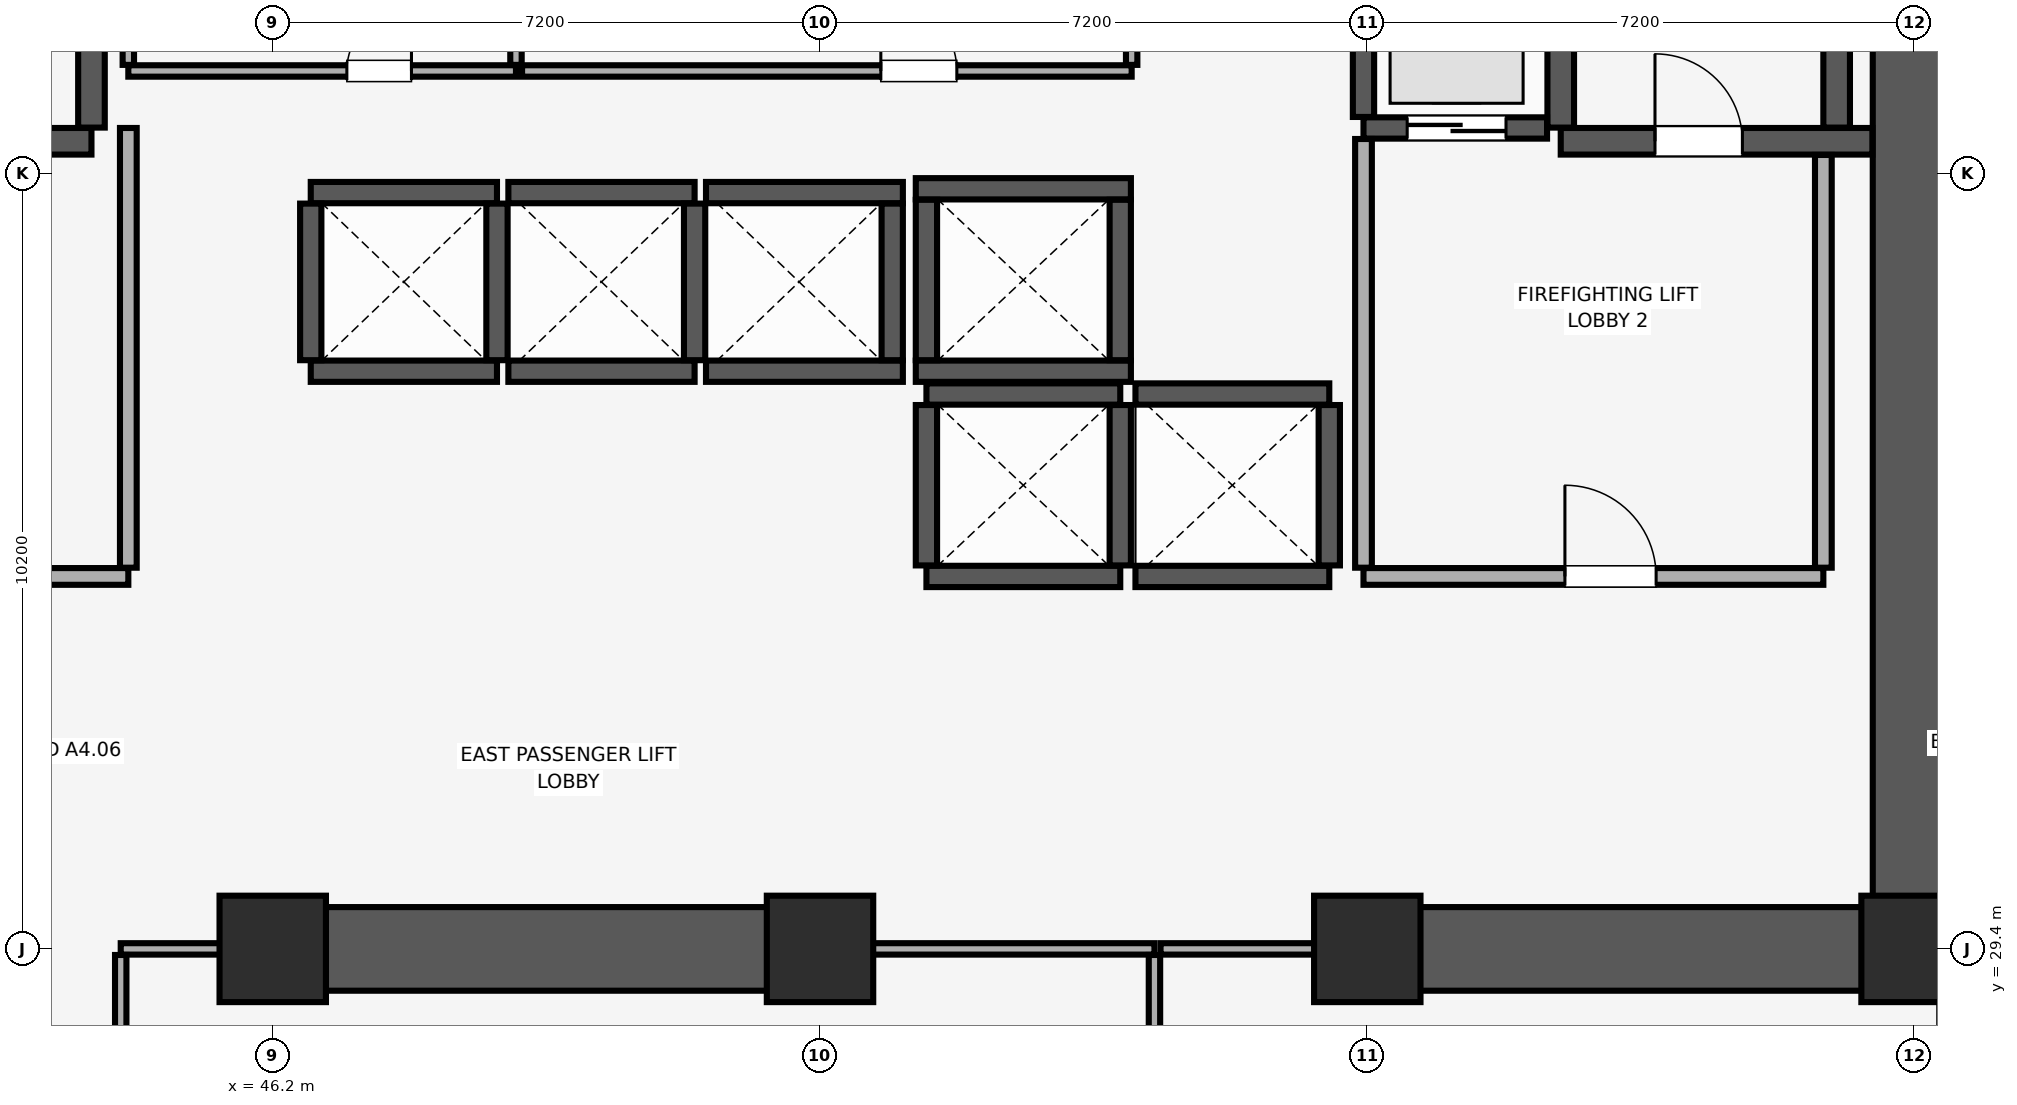
"""IFC4 building model, lengths in metres.
Left out: names, types, materials, properties, quantities, classifications, styles, units other than length and angle.
Written with IfcOpenShell. Run it as: python <this file> out.ifc"""

import sys

from ifc_helpers import new_model, si_unit, direction, frame, frame_2d, origin, origin_2d, place, context, subcontext, project, spatial, rectangle, extrude, element, fill, save


model = new_model("IFC4")
c1 = context("Model", 3, precision=1e-05, world=origin(), true_north=direction((0.0, 1.0)))
c2 = subcontext(c1, "Body", "Model", "MODEL_VIEW")
j1 = project(units=[si_unit("LENGTHUNIT", "METRE"), si_unit("PLANEANGLEUNIT", "RADIAN")], contexts=[c1])
p1 = place(None, origin())
s1 = spatial("IfcSite", under=j1, at=p1, CompositionType="ELEMENT")
p2 = place(p1, origin())
s2 = spatial("IfcBuilding", under=s1, at=p2, CompositionType="ELEMENT")
p3 = place(p2, frame((0.0, 0.0, 57.65)))
s3 = spatial("IfcBuildingStorey", under=s2, at=p3, CompositionType="ELEMENT", Elevation=57.65)
for number, where, z_axis, x_axis in (
    (1, (46.2, 29.4, 0.0), (0.0, 0.0, 1.0), (1.0, 0.0, 0.0)),
    (2, (53.4, 29.4, 0.0), (0.0, 0.0, 1.0), (1.0, 0.0, 0.0)),
    (3, (60.6, 29.4, 0.0), (0.0, 0.0, 1.0), (1.0, 0.0, 0.0)),
    (4, (67.8, 29.4, 0.0), (0.0, 0.0, 1.0), (1.0, 0.0, 0.0)),
):
    element("IfcColumn", number, at=place(p3, frame(where, z_axis=z_axis, x_axis=x_axis)), inside=s3, PredefinedType="COLUMN", context=c2, shape_type="SweptSolid", body=[
        extrude(rectangle(XDim=1.4, YDim=1.4, at=origin_2d()), origin(), (0.0, 0.0, 1.0), 3.51),
    ])
p4 = place(p3, frame((67.8, 29.4, 0.0), z_axis=(0.0, 0.0, 1.0), x_axis=(0.0, 1.0, 0.0)))
e5 = element("IfcWall", 5, at=p4, inside=s3, PredefinedType="SHEAR", context=c2, shape_type="SweptSolid", body=[
    extrude(rectangle(XDim=19.2, YDim=1.1, at=frame_2d((9.6, 0.0))), origin(), (0.0, 0.0, 1.0), 3.51),
])
p5 = place(p3, frame((46.0, 29.4, 0.0), z_axis=(0.0, 0.0, 1.0), x_axis=(1.0, 0.0, 0.0)))
e6 = element("IfcWall", 6, at=p5, inside=s3, PredefinedType="SHEAR", context=c2, shape_type="SweptSolid", body=[
    extrude(rectangle(XDim=7.6, YDim=1.1, at=frame_2d((3.8, 0.0))), origin(), (0.0, 0.0, 1.0), 3.51),
])
p6 = place(p3, frame((60.4, 29.4, 0.0), z_axis=(0.0, 0.0, 1.0), x_axis=(1.0, 0.0, 0.0)))
e7 = element("IfcWall", 7, at=p6, inside=s3, PredefinedType="SHEAR", context=c2, shape_type="SweptSolid", body=[
    extrude(rectangle(XDim=6.845, YDim=1.1, at=frame_2d((3.423, 0.0))), origin(), (0.0, 0.0, 1.0), 3.51),
])
p7 = place(p3, frame((40.185, 40.025, 0.0), z_axis=(0.0, 0.0, 1.0), x_axis=(1.0, 0.0, 0.0)))
e8 = element("IfcWall", 8, at=p7, inside=s3, PredefinedType="SHEAR", context=c2, shape_type="SweptSolid", body=[
    extrude(rectangle(XDim=3.63, YDim=0.35, at=frame_2d((1.815, 0.0))), origin(), (0.0, 0.0, 1.0), 3.51),
])
p8 = place(p7, frame((1.24, 0.0, 0.0)))
e9 = element("IfcOpeningElement", 9, at=p8, cuts=e8, PredefinedType="OPENING", context=c2, shape_type="SweptSolid", body=[
    extrude(rectangle(XDim=1.15, YDim=2.15, at=frame_2d((0.575, 1.075))), frame((0.0, 0.185, 0.0), z_axis=(0.0, -1.0, 0.0), x_axis=(1.0, 0.0, 0.0)), (0.0, 0.0, 1.0), 0.37),
])
p9 = place(p3, frame((43.815, 40.205, 0.0), z_axis=(0.0, 0.0, 1.0), x_axis=(0.0, 1.0, 0.0)))
e10 = element("IfcWall", 10, at=p9, inside=s3, PredefinedType="SHEAR", context=c2, shape_type="SweptSolid", body=[
    extrude(rectangle(XDim=8.09, YDim=0.35, at=frame_2d((4.045, 0.0))), origin(), (0.0, 0.0, 1.0), 3.51),
])
p10 = place(p3, frame((63.145, 40.025, 0.0), z_axis=(0.0, 0.0, 1.0), x_axis=(1.0, 0.0, 0.0)))
e11 = element("IfcWall", 11, at=p10, inside=s3, PredefinedType="SHEAR", context=c2, shape_type="SweptSolid", body=[
    extrude(rectangle(XDim=4.1, YDim=0.35, at=frame_2d((2.05, 0.0))), origin(), (0.0, 0.0, 1.0), 3.51),
])
p11 = place(p10, frame((1.24, 0.0, 0.0)))
e12 = element("IfcOpeningElement", 12, at=p11, cuts=e11, PredefinedType="OPENING", context=c2, shape_type="SweptSolid", body=[
    extrude(rectangle(XDim=1.15, YDim=2.15, at=frame_2d((0.575, 1.075))), frame((0.0, 0.185, 0.0), z_axis=(0.0, -1.0, 0.0), x_axis=(1.0, 0.0, 0.0)), (0.0, 0.0, 1.0), 0.37),
])
for number, where, z_axis, x_axis in (
    (13, (63.145, 40.205, 0.0), (0.0, 0.0, 1.0), (0.0, 1.0, 0.0)),
    (14, (66.775, 40.205, 0.0), (0.0, 0.0, 1.0), (0.0, 1.0, 0.0)),
):
    element("IfcWall", number, at=place(p3, frame(where, z_axis=z_axis, x_axis=x_axis)), inside=s3, PredefinedType="SHEAR", context=c2, shape_type="SweptSolid", body=[
        extrude(rectangle(XDim=8.09, YDim=0.35, at=frame_2d((4.045, 0.0))), origin(), (0.0, 0.0, 1.0), 3.51),
    ])
for number, where, z_axis, x_axis in (
    (15, (46.7, 37.0, 0.0), (0.0, 0.0, 1.0), (1.0, 0.0, 0.0)),
    (16, (46.7, 39.35, 0.0), (0.0, 0.0, 1.0), (1.0, 0.0, 0.0)),
):
    element("IfcWall", number, at=place(p3, frame(where, z_axis=z_axis, x_axis=x_axis)), inside=s3, PredefinedType="SHEAR", context=c2, shape_type="SweptSolid", body=[
        extrude(rectangle(XDim=2.45, YDim=0.28, at=frame_2d((1.225, 0.0))), origin(), (0.0, 0.0, 1.0), 3.51),
    ])
for number, where, z_axis, x_axis in (
    (17, (46.7, 37.145, 0.0), (0.0, 0.0, 1.0), (0.0, 1.0, 0.0)),
    (18, (49.15, 37.145, 0.0), (0.0, 0.0, 1.0), (0.0, 1.0, 0.0)),
):
    element("IfcWall", number, at=place(p3, frame(where, z_axis=z_axis, x_axis=x_axis)), inside=s3, PredefinedType="SHEAR", context=c2, shape_type="SweptSolid", body=[
        extrude(rectangle(XDim=2.06, YDim=0.28, at=frame_2d((1.03, 0.0))), origin(), (0.0, 0.0, 1.0), 3.51),
    ])
for number, where, z_axis, x_axis in (
    (19, (49.3, 37.0, 0.0), (0.0, 0.0, 1.0), (1.0, 0.0, 0.0)),
    (20, (49.3, 39.35, 0.0), (0.0, 0.0, 1.0), (1.0, 0.0, 0.0)),
):
    element("IfcWall", number, at=place(p3, frame(where, z_axis=z_axis, x_axis=x_axis)), inside=s3, PredefinedType="SHEAR", context=c2, shape_type="SweptSolid", body=[
        extrude(rectangle(XDim=2.45, YDim=0.28, at=frame_2d((1.225, 0.0))), origin(), (0.0, 0.0, 1.0), 3.51),
    ])
p12 = place(p3, frame((51.75, 37.145, 0.0), z_axis=(0.0, 0.0, 1.0), x_axis=(0.0, 1.0, 0.0)))
e21 = element("IfcWall", 21, at=p12, inside=s3, PredefinedType="SHEAR", context=c2, shape_type="SweptSolid", body=[
    extrude(rectangle(XDim=2.06, YDim=0.28, at=frame_2d((1.03, 0.0))), origin(), (0.0, 0.0, 1.0), 3.51),
])
for number, where, z_axis, x_axis in (
    (22, (51.9, 37.0, 0.0), (0.0, 0.0, 1.0), (1.0, 0.0, 0.0)),
    (23, (51.9, 39.35, 0.0), (0.0, 0.0, 1.0), (1.0, 0.0, 0.0)),
):
    element("IfcWall", number, at=place(p3, frame(where, z_axis=z_axis, x_axis=x_axis)), inside=s3, PredefinedType="SHEAR", context=c2, shape_type="SweptSolid", body=[
        extrude(rectangle(XDim=2.59, YDim=0.28, at=frame_2d((1.295, 0.0))), origin(), (0.0, 0.0, 1.0), 3.51),
    ])
p13 = place(p3, frame((54.35, 37.145, 0.0), z_axis=(0.0, 0.0, 1.0), x_axis=(0.0, 1.0, 0.0)))
e24 = element("IfcWall", 24, at=p13, inside=s3, PredefinedType="SHEAR", context=c2, shape_type="SweptSolid", body=[
    extrude(rectangle(XDim=2.06, YDim=0.28, at=frame_2d((1.03, 0.0))), origin(), (0.0, 0.0, 1.0), 3.51),
])
for number, where, z_axis, x_axis in (
    (25, (54.8, 34.3, 0.0), (0.0, 0.0, 1.0), (1.0, 0.0, 0.0)),
    (26, (54.8, 36.7, 0.0), (0.0, 0.0, 1.0), (1.0, 0.0, 0.0)),
):
    element("IfcWall", number, at=place(p3, frame(where, z_axis=z_axis, x_axis=x_axis)), inside=s3, PredefinedType="SHEAR", context=c2, shape_type="SweptSolid", body=[
        extrude(rectangle(XDim=2.55, YDim=0.28, at=frame_2d((1.275, 0.0))), origin(), (0.0, 0.0, 1.0), 3.51),
    ])
for number, where, z_axis, x_axis in (
    (27, (54.8, 34.445, 0.0), (0.0, 0.0, 1.0), (0.0, 1.0, 0.0)),
    (28, (57.35, 34.445, 0.0), (0.0, 0.0, 1.0), (0.0, 1.0, 0.0)),
):
    element("IfcWall", number, at=place(p3, frame(where, z_axis=z_axis, x_axis=x_axis)), inside=s3, PredefinedType="SHEAR", context=c2, shape_type="SweptSolid", body=[
        extrude(rectangle(XDim=2.11, YDim=0.28, at=frame_2d((1.055, 0.0))), origin(), (0.0, 0.0, 1.0), 3.51),
    ])
for number, where, z_axis, x_axis in (
    (29, (57.55, 34.3, 0.0), (0.0, 0.0, 1.0), (1.0, 0.0, 0.0)),
    (30, (57.55, 36.7, 0.0), (0.0, 0.0, 1.0), (1.0, 0.0, 0.0)),
):
    element("IfcWall", number, at=place(p3, frame(where, z_axis=z_axis, x_axis=x_axis)), inside=s3, PredefinedType="SHEAR", context=c2, shape_type="SweptSolid", body=[
        extrude(rectangle(XDim=2.55, YDim=0.28, at=frame_2d((1.275, 0.0))), origin(), (0.0, 0.0, 1.0), 3.51),
    ])
p14 = place(p3, frame((60.1, 34.445, 0.0), z_axis=(0.0, 0.0, 1.0), x_axis=(0.0, 1.0, 0.0)))
e31 = element("IfcWall", 31, at=p14, inside=s3, PredefinedType="SHEAR", context=c2, shape_type="SweptSolid", body=[
    extrude(rectangle(XDim=2.11, YDim=0.28, at=frame_2d((1.055, 0.0))), origin(), (0.0, 0.0, 1.0), 3.51),
])
for number, where, z_axis, x_axis in (
    (32, (54.66, 37.0, 0.0), (0.0, 0.0, 1.0), (1.0, 0.0, 0.0)),
    (33, (54.66, 39.4, 0.0), (0.0, 0.0, 1.0), (1.0, 0.0, 0.0)),
):
    element("IfcWall", number, at=place(p3, frame(where, z_axis=z_axis, x_axis=x_axis)), inside=s3, PredefinedType="SHEAR", context=c2, shape_type="SweptSolid", body=[
        extrude(rectangle(XDim=2.83, YDim=0.28, at=frame_2d((1.415, 0.0))), origin(), (0.0, 0.0, 1.0), 3.51),
    ])
for number, where, z_axis, x_axis in (
    (34, (54.8, 37.145, 0.0), (0.0, 0.0, 1.0), (0.0, 1.0, 0.0)),
    (35, (57.35, 37.145, 0.0), (0.0, 0.0, 1.0), (0.0, 1.0, 0.0)),
):
    element("IfcWall", number, at=place(p3, frame(where, z_axis=z_axis, x_axis=x_axis)), inside=s3, PredefinedType="SHEAR", context=c2, shape_type="SweptSolid", body=[
        extrude(rectangle(XDim=2.11, YDim=0.28, at=frame_2d((1.055, 0.0))), origin(), (0.0, 0.0, 1.0), 3.51),
    ])
p15 = place(p3, frame((60.55, 40.2, 0.0), z_axis=(0.0, 0.0, 1.0), x_axis=(1.0, 0.0, 0.0)))
e36 = element("IfcWall", 36, at=p15, inside=s3, PredefinedType="SHEAR", context=c2, shape_type="SweptSolid", body=[
    extrude(rectangle(XDim=2.415, YDim=0.28, at=frame_2d((1.208, 0.0))), origin(), (0.0, 0.0, 1.0), 3.51),
])
p16 = place(p15, frame((0.575, 0.0, 0.0)))
e37 = element("IfcOpeningElement", 37, at=p16, cuts=e36, PredefinedType="OPENING", context=c2, shape_type="SweptSolid", body=[
    extrude(rectangle(XDim=1.3, YDim=2.3, at=frame_2d((0.65, 1.15))), frame((0.0, 0.15, 0.0), z_axis=(0.0, -1.0, 0.0), x_axis=(1.0, 0.0, 0.0)), (0.0, 0.0, 1.0), 0.3),
])
p17 = place(p3, frame((60.55, 40.345, 0.0), z_axis=(0.0, 0.0, 1.0), x_axis=(0.0, 1.0, 0.0)))
e38 = element("IfcWall", 38, at=p17, inside=s3, PredefinedType="SHEAR", context=c2, shape_type="SweptSolid", body=[
    extrude(rectangle(XDim=2.81, YDim=0.28, at=frame_2d((1.405, 0.0))), origin(), (0.0, 0.0, 1.0), 3.51),
])
p18 = place(p3, frame((60.55, 34.3, 0.0), z_axis=(0.0, 0.0, 1.0), x_axis=(1.0, 0.0, 0.0)))
e39 = element("IfcWall", 39, at=p18, inside=s3, PredefinedType="PARTITIONING", context=c2, shape_type="SweptSolid", body=[
    extrude(rectangle(XDim=6.05, YDim=0.22, at=frame_2d((3.025, 0.0))), origin(), (0.0, 0.0, 1.0), 3.51),
])
p19 = place(p18, frame((2.65, 0.0, 0.0)))
e40 = element("IfcOpeningElement", 40, at=p19, cuts=e39, PredefinedType="OPENING", context=c2, shape_type="SweptSolid", body=[
    extrude(rectangle(XDim=1.2, YDim=2.15, at=frame_2d((0.6, 1.075))), frame((0.0, 0.12, 0.0), z_axis=(0.0, -1.0, 0.0), x_axis=(1.0, 0.0, 0.0)), (0.0, 0.0, 1.0), 0.24),
])
p20 = place(p3, frame((60.55, 34.415, 0.0), z_axis=(0.0, 0.0, 1.0), x_axis=(0.0, 1.0, 0.0)))
e41 = element("IfcWall", 41, at=p20, inside=s3, PredefinedType="PARTITIONING", context=c2, shape_type="SweptSolid", body=[
    extrude(rectangle(XDim=5.64, YDim=0.22, at=frame_2d((2.82, 0.0))), origin(), (0.0, 0.0, 1.0), 3.51),
])
p21 = place(p3, frame((66.6, 34.415, 0.0), z_axis=(0.0, 0.0, 1.0), x_axis=(0.0, 1.0, 0.0)))
e42 = element("IfcWall", 42, at=p21, inside=s3, PredefinedType="PARTITIONING", context=c2, shape_type="SweptSolid", body=[
    extrude(rectangle(XDim=5.43, YDim=0.22, at=frame_2d((2.715, 0.0))), origin(), (0.0, 0.0, 1.0), 3.51),
])
p22 = place(p3, frame((39.7, 34.3, 0.0), z_axis=(0.0, 0.0, 1.0), x_axis=(1.0, 0.0, 0.0)))
e43 = element("IfcWall", 43, at=p22, inside=s3, PredefinedType="PARTITIONING", context=c2, shape_type="SweptSolid", body=[
    extrude(rectangle(XDim=4.6, YDim=0.22, at=frame_2d((2.3, 0.0))), origin(), (0.0, 0.0, 1.0), 3.51),
])
p23 = place(p22, frame((1.7, 0.0, 0.0)))
e44 = element("IfcOpeningElement", 44, at=p23, cuts=e43, PredefinedType="OPENING", context=c2, shape_type="SweptSolid", body=[
    extrude(rectangle(XDim=1.2, YDim=2.15, at=frame_2d((0.6, 1.075))), frame((0.0, 0.12, 0.0), z_axis=(0.0, -1.0, 0.0), x_axis=(1.0, 0.0, 0.0)), (0.0, 0.0, 1.0), 0.24),
])
p24 = place(p3, frame((44.3, 34.415, 0.0), z_axis=(0.0, 0.0, 1.0), x_axis=(0.0, 1.0, 0.0)))
e45 = element("IfcWall", 45, at=p24, inside=s3, PredefinedType="PARTITIONING", context=c2, shape_type="SweptSolid", body=[
    extrude(rectangle(XDim=5.785, YDim=0.22, at=frame_2d((2.893, 0.0))), origin(), (0.0, 0.0, 1.0), 3.51),
])
p25 = place(p3, frame((44.3, 40.95, 0.0), z_axis=(0.0, 0.0, 1.0), x_axis=(1.0, 0.0, 0.0)))
e46 = element("IfcWall", 46, at=p25, inside=s3, PredefinedType="PARTITIONING", context=c2, shape_type="SweptSolid", body=[
    extrude(rectangle(XDim=5.1, YDim=0.15, at=frame_2d((2.55, 0.0))), origin(), (0.0, 0.0, 1.0), 3.51),
])
p26 = place(p25, frame((2.875, 0.0, 0.0)))
e47 = element("IfcOpeningElement", 47, at=p26, cuts=e46, PredefinedType="OPENING", context=c2, shape_type="SweptSolid", body=[
    extrude(rectangle(XDim=0.85, YDim=2.1, at=frame_2d((0.425, 1.05))), frame((0.0, 0.085, 0.0), z_axis=(0.0, -1.0, 0.0), x_axis=(1.0, 0.0, 0.0)), (0.0, 0.0, 1.0), 0.17),
])
for number, where, z_axis, x_axis in (
    (48, (44.3, 41.03, 0.0), (0.0, 0.0, 1.0), (0.0, 1.0, 0.0)),
    (49, (49.4, 41.03, 0.0), (0.0, 0.0, 1.0), (0.0, 1.0, 0.0)),
):
    element("IfcWall", number, at=place(p3, frame(where, z_axis=z_axis, x_axis=x_axis)), inside=s3, PredefinedType="PARTITIONING", context=c2, shape_type="SweptSolid", body=[
        extrude(rectangle(XDim=7.82, YDim=0.15, at=frame_2d((3.91, 0.0))), origin(), (0.0, 0.0, 1.0), 3.51),
    ])
p27 = place(p3, frame((49.48, 40.95, 0.0), z_axis=(0.0, 0.0, 1.0), x_axis=(1.0, 0.0, 0.0)))
e50 = element("IfcWall", 50, at=p27, inside=s3, PredefinedType="PARTITIONING", context=c2, shape_type="SweptSolid", body=[
    extrude(rectangle(XDim=8.02, YDim=0.15, at=frame_2d((4.01, 0.0))), origin(), (0.0, 0.0, 1.0), 3.51),
])
p28 = place(p27, frame((4.72, 0.0, 0.0)))
e51 = element("IfcOpeningElement", 51, at=p28, cuts=e50, PredefinedType="OPENING", context=c2, shape_type="SweptSolid", body=[
    extrude(rectangle(XDim=1.0, YDim=2.15, at=frame_2d((0.5, 1.075))), frame((0.0, 0.085, 0.0), z_axis=(0.0, -1.0, 0.0), x_axis=(1.0, 0.0, 0.0)), (0.0, 0.0, 1.0), 0.17),
])
p29 = place(p3, frame((57.5, 41.03, 0.0), z_axis=(0.0, 0.0, 1.0), x_axis=(0.0, 1.0, 0.0)))
e52 = element("IfcWall", 52, at=p29, inside=s3, PredefinedType="PARTITIONING", context=c2, shape_type="SweptSolid", body=[
    extrude(rectangle(XDim=2.155, YDim=0.15, at=frame_2d((1.078, 0.0))), origin(), (0.0, 0.0, 1.0), 3.51),
])
p30 = place(p3, frame((44.2, 29.4, 0.0), z_axis=(0.0, 0.0, 1.0), x_axis=(1.0, 0.0, 0.0)))
e53 = element("IfcWall", 53, at=p30, inside=s3, PredefinedType="PARTITIONING", context=c2, shape_type="SweptSolid", body=[
    extrude(rectangle(XDim=1.79, YDim=0.15, at=frame_2d((0.895, 0.0))), origin(), (0.0, 0.0, 1.0), 2.41),
])
p31 = place(p3, frame((53.61, 29.4, 0.0), z_axis=(0.0, 0.0, 1.0), x_axis=(1.0, 0.0, 0.0)))
e54 = element("IfcWall", 54, at=p31, inside=s3, PredefinedType="PARTITIONING", context=c2, shape_type="SweptSolid", body=[
    extrude(rectangle(XDim=4.19, YDim=0.15, at=frame_2d((2.095, 0.0))), origin(), (0.0, 0.0, 1.0), 2.41),
])
for number, where, z_axis, x_axis in (
    (55, (44.2, 13.53, 0.0), (0.0, 0.0, 1.0), (0.0, 1.0, 0.0)),
    (56, (57.8, 13.53, 0.0), (0.0, 0.0, 1.0), (0.0, 1.0, 0.0)),
):
    element("IfcWall", number, at=place(p3, frame(where, z_axis=z_axis, x_axis=x_axis)), inside=s3, PredefinedType="PARTITIONING", context=c2, shape_type="SweptSolid", body=[
        extrude(rectangle(XDim=15.79, YDim=0.15, at=frame_2d((7.895, 0.0))), origin(), (0.0, 0.0, 1.0), 3.51),
    ])
p32 = place(p3, frame((57.88, 29.4, 0.0), z_axis=(0.0, 0.0, 1.0), x_axis=(1.0, 0.0, 0.0)))
e57 = element("IfcWall", 57, at=p32, inside=s3, PredefinedType="PARTITIONING", context=c2, shape_type="SweptSolid", body=[
    extrude(rectangle(XDim=2.51, YDim=0.15, at=frame_2d((1.255, 0.0))), origin(), (0.0, 0.0, 1.0), 2.41),
])
p33 = place(p11, origin())
e58 = element("IfcDoor", 58, at=p33, inside=s3, OperationType="SINGLE_SWING_LEFT", PredefinedType="DOOR", context=c2, shape_type="SweptSolid", body=[
    extrude(rectangle(XDim=1.15, YDim=2.15, at=frame_2d((0.575, 1.075))), frame((0.0, 0.025, 0.0), z_axis=(0.0, -1.0, 0.0), x_axis=(1.0, 0.0, 0.0)), (0.0, 0.0, 1.0), 0.05),
])
fill(e12, e58)
p34 = place(p16, origin())
e59 = element("IfcDoor", 59, at=p34, inside=s3, OperationType="DOUBLE_DOOR_SLIDING", PredefinedType="DOOR", context=c2, shape_type="SweptSolid", body=[
    extrude(rectangle(XDim=1.3, YDim=2.3, at=frame_2d((0.65, 1.15))), frame((0.0, 0.025, 0.0), z_axis=(0.0, -1.0, 0.0), x_axis=(1.0, 0.0, 0.0)), (0.0, 0.0, 1.0), 0.05),
])
fill(e37, e59)
p35 = place(p19, origin())
e60 = element("IfcDoor", 60, at=p35, inside=s3, OperationType="SINGLE_SWING_LEFT", PredefinedType="DOOR", context=c2, shape_type="SweptSolid", body=[
    extrude(rectangle(XDim=1.2, YDim=2.15, at=frame_2d((0.6, 1.075))), frame((0.0, 0.025, 0.0), z_axis=(0.0, -1.0, 0.0), x_axis=(1.0, 0.0, 0.0)), (0.0, 0.0, 1.0), 0.05),
])
fill(e40, e60)
p36 = place(p26, origin())
e61 = element("IfcDoor", 61, at=p36, inside=s3, OperationType="SINGLE_SWING_RIGHT", PredefinedType="DOOR", context=c2, shape_type="SweptSolid", body=[
    extrude(rectangle(XDim=0.85, YDim=2.1, at=frame_2d((0.425, 1.05))), frame((0.0, 0.025, 0.0), z_axis=(0.0, -1.0, 0.0), x_axis=(1.0, 0.0, 0.0)), (0.0, 0.0, 1.0), 0.05),
])
fill(e47, e61)
p37 = place(p28, origin())
e62 = element("IfcDoor", 62, at=p37, inside=s3, OperationType="SINGLE_SWING_LEFT", PredefinedType="DOOR", context=c2, shape_type="SweptSolid", body=[
    extrude(rectangle(XDim=1.0, YDim=2.15, at=frame_2d((0.5, 1.075))), frame((0.0, 0.025, 0.0), z_axis=(0.0, -1.0, 0.0), x_axis=(1.0, 0.0, 0.0)), (0.0, 0.0, 1.0), 0.05),
])
fill(e51, e62)
save(model, sys.argv[1])
